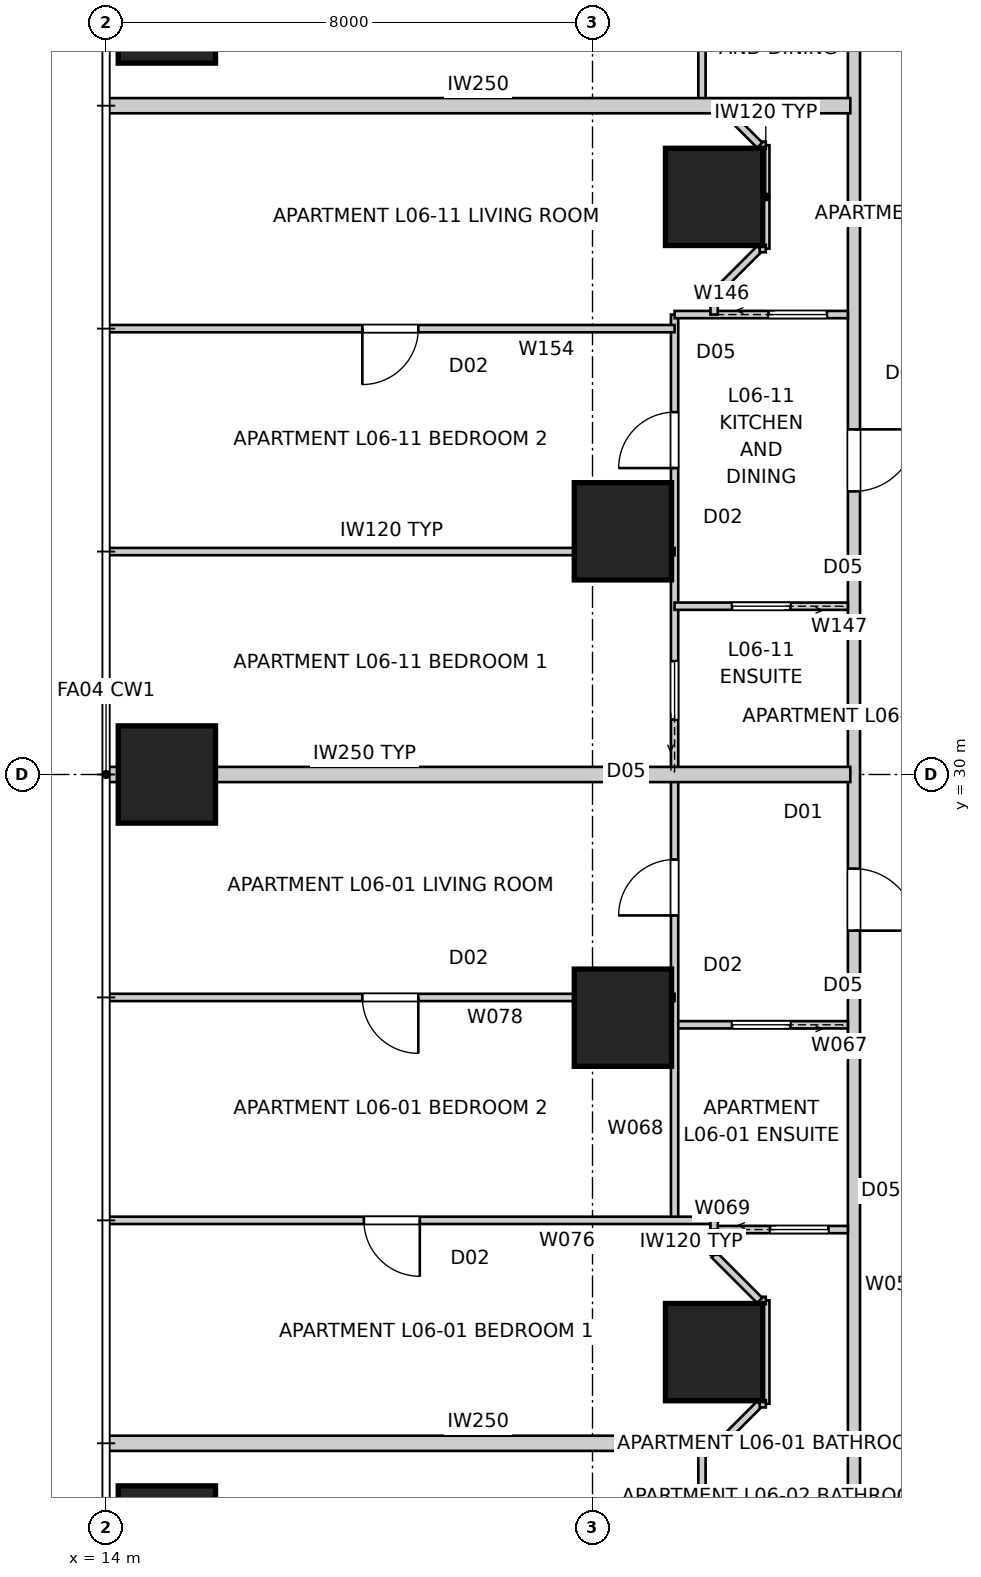
"""IFC4 building model, lengths in metres.
Left out: names, types, materials, properties, quantities, classifications, styles, units other than length and angle.
Written with IfcOpenShell. Run it as: python <this file> out.ifc"""

import sys

from ifc_helpers import new_model, si_unit, direction, frame, frame_2d, origin, origin_2d, place, context, subcontext, project, spatial, rectangle, extrude, element, fill, save


model = new_model("IFC4")
c1 = context("Model", 3, precision=1e-05, world=origin(), true_north=direction((0.0, 1.0)))
c2 = subcontext(c1, "Body", "Model", "MODEL_VIEW")
j1 = project(units=[si_unit("LENGTHUNIT", "METRE"), si_unit("PLANEANGLEUNIT", "RADIAN")], contexts=[c1])
p1 = place(None, origin())
s1 = spatial("IfcSite", under=j1, at=p1, CompositionType="ELEMENT")
p2 = place(p1, origin())
s2 = spatial("IfcBuilding", under=s1, at=p2, CompositionType="ELEMENT")
p3 = place(p2, frame((0.0, 0.0, 25.2)))
s3 = spatial("IfcBuildingStorey", under=s2, at=p3, CompositionType="ELEMENT", Elevation=25.2)
for number, where, z_axis, x_axis in (
    (1, (15.0, 42.5, 0.0), (0.0, 0.0, 1.0), (1.0, 0.0, 0.0)),
    (2, (15.0, 30.0, 0.0), (0.0, 0.0, 1.0), (1.0, 0.0, 0.0)),
    (3, (15.0, 17.5, 0.0), (0.0, 0.0, 1.0), (1.0, 0.0, 0.0)),
    (4, (24.0, 39.5, 0.0), (0.0, 0.0, 1.0), (1.0, 0.0, 0.0)),
    (5, (22.5, 34.0, 0.0), (0.0, 0.0, 1.0), (1.0, 0.0, 0.0)),
    (6, (22.5, 26.0, 0.0), (0.0, 0.0, 1.0), (1.0, 0.0, 0.0)),
    (7, (24.0, 20.5, 0.0), (0.0, 0.0, 1.0), (1.0, 0.0, 0.0)),
):
    element("IfcColumn", number, at=place(p3, frame(where, z_axis=z_axis, x_axis=x_axis)), inside=s3, PredefinedType="COLUMN", context=c2, shape_type="SweptSolid", body=[
        extrude(rectangle(XDim=1.6, YDim=1.6, at=origin_2d()), origin(), (0.0, 0.0, 1.0), 3.4),
    ])
p4 = place(p3, frame((26.3, 46.3, 0.0), z_axis=(0.0, 0.0, 1.0), x_axis=(0.0, -1.0, 0.0)))
e8 = element("IfcWall", 8, at=p4, inside=s3, PredefinedType="PARTITIONING", context=c2, shape_type="SweptSolid", body=[
    extrude(rectangle(XDim=32.6, YDim=0.2, at=frame_2d((16.3, 0.0))), origin(), (0.0, 0.0, 1.0), 3.25),
])
p5 = place(p4, frame((2.315, 0.0, 0.0)))
e9 = element("IfcOpeningElement", 9, at=p5, cuts=e8, PredefinedType="OPENING", context=c2, shape_type="SweptSolid", body=[
    extrude(rectangle(XDim=1.02, YDim=2.34, at=frame_2d((0.51, 1.17))), frame((0.0, 0.11, 0.0), z_axis=(0.0, -1.0, 0.0), x_axis=(1.0, 0.0, 0.0)), (0.0, 0.0, 1.0), 0.22),
])
p6 = place(p4, frame((10.624, 0.0, 0.0)))
e10 = element("IfcOpeningElement", 10, at=p6, cuts=e8, PredefinedType="OPENING", context=c2, shape_type="SweptSolid", body=[
    extrude(rectangle(XDim=1.02, YDim=2.34, at=frame_2d((0.51, 1.17))), frame((0.0, 0.11, 0.0), z_axis=(0.0, -1.0, 0.0), x_axis=(1.0, 0.0, 0.0)), (0.0, 0.0, 1.0), 0.22),
])
p7 = place(p4, frame((17.848, 0.0, 0.0)))
e11 = element("IfcOpeningElement", 11, at=p7, cuts=e8, PredefinedType="OPENING", context=c2, shape_type="SweptSolid", body=[
    extrude(rectangle(XDim=1.02, YDim=2.34, at=frame_2d((0.51, 1.17))), frame((0.0, 0.11, 0.0), z_axis=(0.0, -1.0, 0.0), x_axis=(1.0, 0.0, 0.0)), (0.0, 0.0, 1.0), 0.22),
])
p8 = place(p4, frame((30.516, 0.0, 0.0)))
e12 = element("IfcOpeningElement", 12, at=p8, cuts=e8, PredefinedType="OPENING", context=c2, shape_type="SweptSolid", body=[
    extrude(rectangle(XDim=1.02, YDim=2.34, at=frame_2d((0.51, 1.17))), frame((0.0, 0.11, 0.0), z_axis=(0.0, -1.0, 0.0), x_axis=(1.0, 0.0, 0.0)), (0.0, 0.0, 1.0), 0.22),
])
for number, where, z_axis, x_axis in (
    (13, (14.0, 41.0, 0.0), (0.0, 0.0, 1.0), (1.0, 0.0, 0.0)),
    (14, (14.0, 19.0, 0.0), (0.0, 0.0, 1.0), (1.0, 0.0, 0.0)),
):
    element("IfcWall", number, at=place(p3, frame(where, z_axis=z_axis, x_axis=x_axis)), inside=s3, PredefinedType="PARTITIONING", context=c2, shape_type="SweptSolid", body=[
        extrude(rectangle(XDim=12.24, YDim=0.25, at=frame_2d((6.12, 0.0))), origin(), (0.0, 0.0, 1.0), 3.25),
    ])
p9 = place(p3, frame((14.0, 30.0, 0.0), z_axis=(0.0, 0.0, 1.0), x_axis=(1.0, 0.0, 0.0)))
e15 = element("IfcWall", 15, at=p9, inside=s3, PredefinedType="PARTITIONING", context=c2, shape_type="SweptSolid", body=[
    extrude(rectangle(XDim=8.5, YDim=0.25, at=frame_2d((4.25, 0.0))), origin(), (0.0, 0.0, 1.0), 3.25),
])
p10 = place(p3, frame((22.5, 30.0, 0.0), z_axis=(0.0, 0.0, 1.0), x_axis=(1.0, 0.0, 0.0)))
e16 = element("IfcWall", 16, at=p10, inside=s3, PredefinedType="PARTITIONING", context=c2, shape_type="SweptSolid", body=[
    extrude(rectangle(XDim=3.74, YDim=0.25, at=frame_2d((1.87, 0.0))), origin(), (0.0, 0.0, 1.0), 2.796),
])
p11 = place(p3, frame((26.2, 25.884, 0.0), z_axis=(0.0, 0.0, 1.0), x_axis=(-1.0, 0.0, 0.0)))
e17 = element("IfcWall", 17, at=p11, inside=s3, PredefinedType="PARTITIONING", context=c2, shape_type="SweptSolid", body=[
    extrude(rectangle(XDim=2.85, YDim=0.12, at=frame_2d((1.425, 0.0))), origin(), (0.0, 0.0, 1.0), 3.25),
])
p12 = place(p11, frame((0.945, 0.0, 0.0)))
e18 = element("IfcOpeningElement", 18, at=p12, cuts=e17, PredefinedType="OPENING", context=c2, shape_type="SweptSolid", body=[
    extrude(rectangle(XDim=0.96, YDim=2.1, at=frame_2d((0.48, 1.05))), frame((0.0, 0.07, 0.0), z_axis=(0.0, -1.0, 0.0), x_axis=(1.0, 0.0, 0.0)), (0.0, 0.0, 1.0), 0.14),
])
p13 = place(p3, frame((23.35, 22.667, 0.0), z_axis=(0.0, 0.0, 1.0), x_axis=(0.0, 1.0, 0.0)))
e19 = element("IfcWall", 19, at=p13, inside=s3, PredefinedType="PARTITIONING", context=c2, shape_type="SweptSolid", body=[
    extrude(rectangle(XDim=14.898, YDim=0.12, at=frame_2d((7.449, 0.0))), origin(), (0.0, 0.0, 1.0), 2.55),
])
p14 = place(p13, frame((12.373, 0.0, 0.0)))
e20 = element("IfcOpeningElement", 20, at=p14, cuts=e19, PredefinedType="OPENING", context=c2, shape_type="SweptSolid", body=[
    extrude(rectangle(XDim=0.92, YDim=2.34, at=frame_2d((0.46, 1.17))), frame((0.0, 0.07, 0.0), z_axis=(0.0, -1.0, 0.0), x_axis=(1.0, 0.0, 0.0)), (0.0, 0.0, 1.0), 0.14),
])
p15 = place(p13, frame((5.015, 0.0, 0.0)))
e21 = element("IfcOpeningElement", 21, at=p15, cuts=e19, PredefinedType="OPENING", context=c2, shape_type="SweptSolid", body=[
    extrude(rectangle(XDim=0.92, YDim=2.34, at=frame_2d((0.46, 1.17))), frame((0.0, 0.07, 0.0), z_axis=(0.0, -1.0, 0.0), x_axis=(1.0, 0.0, 0.0)), (0.0, 0.0, 1.0), 0.14),
])
p16 = place(p13, frame((8.237, 0.0, 0.0)))
e22 = element("IfcOpeningElement", 22, at=p16, cuts=e19, PredefinedType="OPENING", context=c2, shape_type="SweptSolid", body=[
    extrude(rectangle(XDim=0.96, YDim=2.1, at=frame_2d((0.48, 1.05))), frame((0.0, 0.07, 0.0), z_axis=(0.0, -1.0, 0.0), x_axis=(1.0, 0.0, 0.0)), (0.0, 0.0, 1.0), 0.14),
])
p17 = place(p3, frame((24.0, 22.515, 0.0), z_axis=(0.0, 0.0, 1.0), x_axis=(1.0, 0.0, 0.0)))
e23 = element("IfcWall", 23, at=p17, inside=s3, PredefinedType="PARTITIONING", context=c2, shape_type="SweptSolid", body=[
    extrude(rectangle(XDim=2.2, YDim=0.12, at=frame_2d((1.1, 0.0))), origin(), (0.0, 0.0, 1.0), 3.25),
])
p18 = place(p17, frame((0.92, 0.0, 0.0)))
e24 = element("IfcOpeningElement", 24, at=p18, cuts=e23, PredefinedType="OPENING", context=c2, shape_type="SweptSolid", body=[
    extrude(rectangle(XDim=0.96, YDim=2.1, at=frame_2d((0.48, 1.05))), frame((0.0, 0.07, 0.0), z_axis=(0.0, -1.0, 0.0), x_axis=(1.0, 0.0, 0.0)), (0.0, 0.0, 1.0), 0.14),
])
p19 = place(p3, frame((24.1, 19.0, 0.0), z_axis=(0.0, 0.0, 1.0), x_axis=(0.707106781187, 0.707106781187, 0.0)))
e25 = element("IfcWall", 25, at=p19, inside=s3, PredefinedType="PARTITIONING", context=c2, shape_type="SweptSolid", body=[
    extrude(rectangle(XDim=0.919, YDim=0.12, at=frame_2d((0.459, 0.0))), origin(), (0.0, 0.0, 1.0), 3.25),
])
p20 = place(p3, frame((24.85, 19.65, 0.0), z_axis=(0.0, 0.0, 1.0), x_axis=(0.0, 1.0, 0.0)))
e26 = element("IfcWall", 26, at=p20, inside=s3, PredefinedType="PARTITIONING", context=c2, shape_type="SweptSolid", body=[
    extrude(rectangle(XDim=1.7, YDim=0.12, at=frame_2d((0.85, 0.0))), origin(), (0.0, 0.0, 1.0), 3.25),
])
p21 = place(p3, frame((24.75, 21.35, 0.0), z_axis=(0.0, 0.0, 1.0), x_axis=(-0.707106781187, 0.707106781187, 0.0)))
e27 = element("IfcWall", 27, at=p21, inside=s3, PredefinedType="PARTITIONING", context=c2, shape_type="SweptSolid", body=[
    extrude(rectangle(XDim=1.061, YDim=0.12, at=frame_2d((0.53, 0.0))), origin(), (0.0, 0.0, 1.0), 3.25),
])
p22 = place(p3, frame((24.0, 22.1, 0.0), z_axis=(0.0, 0.0, 1.0), x_axis=(0.0, 1.0, 0.0)))
e28 = element("IfcWall", 28, at=p22, inside=s3, PredefinedType="PARTITIONING", context=c2, shape_type="SweptSolid", body=[
    extrude(rectangle(XDim=0.415, YDim=0.12, at=frame_2d((0.208, 0.0))), origin(), (0.0, 0.0, 1.0), 3.25),
])
p23 = place(p3, frame((24.0, 22.667, 0.0), z_axis=(0.0, 0.0, 1.0), x_axis=(-1.0, 0.0, 0.0)))
e29 = element("IfcWall", 29, at=p23, inside=s3, PredefinedType="PARTITIONING", context=c2, shape_type="SweptSolid", body=[
    extrude(rectangle(XDim=9.96, YDim=0.12, at=frame_2d((4.98, 0.0))), origin(), (0.0, 0.0, 1.0), 3.25),
])
p24 = place(p23, frame((4.84, 0.0, 0.0)))
e30 = element("IfcOpeningElement", 30, at=p24, cuts=e29, PredefinedType="OPENING", context=c2, shape_type="SweptSolid", body=[
    extrude(rectangle(XDim=0.92, YDim=2.34, at=frame_2d((0.46, 1.17))), frame((0.0, 0.07, 0.0), z_axis=(0.0, -1.0, 0.0), x_axis=(1.0, 0.0, 0.0)), (0.0, 0.0, 1.0), 0.14),
])
p25 = place(p3, frame((23.35, 26.333, 0.0), z_axis=(0.0, 0.0, 1.0), x_axis=(-1.0, 0.0, 0.0)))
e31 = element("IfcWall", 31, at=p25, inside=s3, PredefinedType="PARTITIONING", context=c2, shape_type="SweptSolid", body=[
    extrude(rectangle(XDim=9.31, YDim=0.12, at=frame_2d((4.655, 0.0))), origin(), (0.0, 0.0, 1.0), 3.25),
])
p26 = place(p25, frame((4.215, 0.0, 0.0)))
e32 = element("IfcOpeningElement", 32, at=p26, cuts=e31, PredefinedType="OPENING", context=c2, shape_type="SweptSolid", body=[
    extrude(rectangle(XDim=0.92, YDim=2.34, at=frame_2d((0.46, 1.17))), frame((0.0, 0.07, 0.0), z_axis=(0.0, -1.0, 0.0), x_axis=(1.0, 0.0, 0.0)), (0.0, 0.0, 1.0), 0.14),
])
p27 = place(p3, frame((23.8, 15.233, 0.0), z_axis=(0.0, 0.0, 1.0), x_axis=(0.0, 1.0, 0.0)))
e33 = element("IfcWall", 33, at=p27, inside=s3, PredefinedType="PARTITIONING", context=c2, shape_type="SweptSolid", body=[
    extrude(rectangle(XDim=3.767, YDim=0.12, at=frame_2d((1.883, 0.0))), origin(), (0.0, 0.0, 1.0), 3.25),
])
p28 = place(p3, frame((23.8, 41.0, 0.0), z_axis=(0.0, 0.0, 1.0), x_axis=(0.0, 1.0, 0.0)))
e34 = element("IfcWall", 34, at=p28, inside=s3, PredefinedType="PARTITIONING", context=c2, shape_type="SweptSolid", body=[
    extrude(rectangle(XDim=7.333, YDim=0.12, at=frame_2d((3.667, 0.0))), origin(), (0.0, 0.0, 1.0), 3.25),
])
p29 = place(p28, frame((3.207, 0.0, 0.0)))
e35 = element("IfcOpeningElement", 35, at=p29, cuts=e34, PredefinedType="OPENING", context=c2, shape_type="SweptSolid", body=[
    extrude(rectangle(XDim=0.92, YDim=2.34, at=frame_2d((0.46, 1.17))), frame((0.0, 0.07, 0.0), z_axis=(0.0, -1.0, 0.0), x_axis=(1.0, 0.0, 0.0)), (0.0, 0.0, 1.0), 0.14),
])
p30 = place(p3, frame((23.35, 37.565, 0.0), z_axis=(0.0, 0.0, 1.0), x_axis=(1.0, 0.0, 0.0)))
e36 = element("IfcWall", 36, at=p30, inside=s3, PredefinedType="PARTITIONING", context=c2, shape_type="SweptSolid", body=[
    extrude(rectangle(XDim=2.85, YDim=0.12, at=frame_2d((1.425, 0.0))), origin(), (0.0, 0.0, 1.0), 3.25),
])
p31 = place(p30, frame((1.545, 0.0, 0.0)))
e37 = element("IfcOpeningElement", 37, at=p31, cuts=e36, PredefinedType="OPENING", context=c2, shape_type="SweptSolid", body=[
    extrude(rectangle(XDim=0.96, YDim=2.1, at=frame_2d((0.48, 1.05))), frame((0.0, 0.07, 0.0), z_axis=(0.0, -1.0, 0.0), x_axis=(1.0, 0.0, 0.0)), (0.0, 0.0, 1.0), 0.14),
])
p32 = place(p3, frame((26.2, 32.768, 0.0), z_axis=(0.0, 0.0, 1.0), x_axis=(-1.0, 0.0, 0.0)))
e38 = element("IfcWall", 38, at=p32, inside=s3, PredefinedType="PARTITIONING", context=c2, shape_type="SweptSolid", body=[
    extrude(rectangle(XDim=2.85, YDim=0.12, at=frame_2d((1.425, 0.0))), origin(), (0.0, 0.0, 1.0), 3.25),
])
p33 = place(p32, frame((0.945, 0.0, 0.0)))
e39 = element("IfcOpeningElement", 39, at=p33, cuts=e38, PredefinedType="OPENING", context=c2, shape_type="SweptSolid", body=[
    extrude(rectangle(XDim=0.96, YDim=2.1, at=frame_2d((0.48, 1.05))), frame((0.0, 0.07, 0.0), z_axis=(0.0, -1.0, 0.0), x_axis=(1.0, 0.0, 0.0)), (0.0, 0.0, 1.0), 0.14),
])
p34 = place(p3, frame((24.0, 37.565, 0.0), z_axis=(0.0, 0.0, 1.0), x_axis=(0.0, 1.0, 0.0)))
e40 = element("IfcWall", 40, at=p34, inside=s3, PredefinedType="PARTITIONING", context=c2, shape_type="SweptSolid", body=[
    extrude(rectangle(XDim=0.335, YDim=0.12, at=frame_2d((0.167, 0.0))), origin(), (0.0, 0.0, 1.0), 3.25),
])
p35 = place(p3, frame((24.0, 37.9, 0.0), z_axis=(0.0, 0.0, 1.0), x_axis=(0.707106781187, 0.707106781187, 0.0)))
e41 = element("IfcWall", 41, at=p35, inside=s3, PredefinedType="PARTITIONING", context=c2, shape_type="SweptSolid", body=[
    extrude(rectangle(XDim=1.061, YDim=0.12, at=frame_2d((0.53, 0.0))), origin(), (0.0, 0.0, 1.0), 3.25),
])
p36 = place(p3, frame((24.85, 38.65, 0.0), z_axis=(0.0, 0.0, 1.0), x_axis=(0.0, 1.0, 0.0)))
e42 = element("IfcWall", 42, at=p36, inside=s3, PredefinedType="PARTITIONING", context=c2, shape_type="SweptSolid", body=[
    extrude(rectangle(XDim=1.7, YDim=0.12, at=frame_2d((0.85, 0.0))), origin(), (0.0, 0.0, 1.0), 3.25),
])
p37 = place(p3, frame((24.75, 40.35, 0.0), z_axis=(0.0, 0.0, 1.0), x_axis=(-0.707106781187, 0.707106781187, 0.0)))
e43 = element("IfcWall", 43, at=p37, inside=s3, PredefinedType="PARTITIONING", context=c2, shape_type="SweptSolid", body=[
    extrude(rectangle(XDim=0.919, YDim=0.12, at=frame_2d((0.459, 0.0))), origin(), (0.0, 0.0, 1.0), 3.25),
])
p38 = place(p3, frame((23.35, 37.333, 0.0), z_axis=(0.0, 0.0, 1.0), x_axis=(-1.0, 0.0, 0.0)))
e44 = element("IfcWall", 44, at=p38, inside=s3, PredefinedType="PARTITIONING", context=c2, shape_type="SweptSolid", body=[
    extrude(rectangle(XDim=9.31, YDim=0.12, at=frame_2d((4.655, 0.0))), origin(), (0.0, 0.0, 1.0), 3.25),
])
p39 = place(p38, frame((4.215, 0.0, 0.0)))
e45 = element("IfcOpeningElement", 45, at=p39, cuts=e44, PredefinedType="OPENING", context=c2, shape_type="SweptSolid", body=[
    extrude(rectangle(XDim=0.92, YDim=2.34, at=frame_2d((0.46, 1.17))), frame((0.0, 0.07, 0.0), z_axis=(0.0, -1.0, 0.0), x_axis=(1.0, 0.0, 0.0)), (0.0, 0.0, 1.0), 0.14),
])
p40 = place(p3, frame((14.04, 33.667, 0.0), z_axis=(0.0, 0.0, 1.0), x_axis=(1.0, 0.0, 0.0)))
e46 = element("IfcWall", 46, at=p40, inside=s3, PredefinedType="PARTITIONING", context=c2, shape_type="SweptSolid", body=[
    extrude(rectangle(XDim=9.31, YDim=0.12, at=frame_2d((4.655, 0.0))), origin(), (0.0, 0.0, 1.0), 3.25),
])
for number, where, z_axis, x_axis in (
    (47, (24.85, 19.65, 0.0), (0.0, 0.0, 1.0), (-1.0, 0.0, 0.0)),
    (48, (24.85, 21.35, 0.0), (0.0, 0.0, 1.0), (-1.0, 0.0, 0.0)),
):
    element("IfcWall", number, at=place(p3, frame(where, z_axis=z_axis, x_axis=x_axis)), inside=s3, PredefinedType="PARTITIONING", context=c2, shape_type="SweptSolid", body=[
        extrude(rectangle(XDim=0.1, YDim=0.12, at=frame_2d((0.05, 0.0))), origin(), (0.0, 0.0, 1.0), 3.25),
    ])
p41 = place(p3, frame((24.0, 22.667, 0.0), z_axis=(0.0, 0.0, 1.0), x_axis=(0.0, -1.0, 0.0)))
e49 = element("IfcWall", 49, at=p41, inside=s3, PredefinedType="PARTITIONING", context=c2, shape_type="SweptSolid", body=[
    extrude(rectangle(XDim=0.151, YDim=0.12, at=frame_2d((0.076, 0.0))), origin(), (0.0, 0.0, 1.0), 3.25),
])
for number, where, z_axis, x_axis in (
    (50, (24.85, 38.65, 0.0), (0.0, 0.0, 1.0), (-1.0, 0.0, 0.0)),
    (51, (24.85, 40.35, 0.0), (0.0, 0.0, 1.0), (-1.0, 0.0, 0.0)),
):
    element("IfcWall", number, at=place(p3, frame(where, z_axis=z_axis, x_axis=x_axis)), inside=s3, PredefinedType="PARTITIONING", context=c2, shape_type="SweptSolid", body=[
        extrude(rectangle(XDim=0.1, YDim=0.12, at=frame_2d((0.05, 0.0))), origin(), (0.0, 0.0, 1.0), 3.25),
    ])
p42 = place(p6, origin())
e52 = element("IfcDoor", 52, at=p42, inside=s3, OperationType="SINGLE_SWING_LEFT", PredefinedType="DOOR", context=c2, shape_type="SweptSolid", body=[
    extrude(rectangle(XDim=1.02, YDim=2.34, at=frame_2d((0.51, 1.17))), frame((0.0, 0.025, 0.0), z_axis=(0.0, -1.0, 0.0), x_axis=(1.0, 0.0, 0.0)), (0.0, 0.0, 1.0), 0.05),
])
fill(e10, e52)
p43 = place(p7, origin())
e53 = element("IfcDoor", 53, at=p43, inside=s3, OperationType="SINGLE_SWING_RIGHT", PredefinedType="DOOR", context=c2, shape_type="SweptSolid", body=[
    extrude(rectangle(XDim=1.02, YDim=2.34, at=frame_2d((0.51, 1.17))), frame((0.0, 0.025, 0.0), z_axis=(0.0, -1.0, 0.0), x_axis=(1.0, 0.0, 0.0)), (0.0, 0.0, 1.0), 0.05),
])
fill(e11, e53)
p44 = place(p14, origin())
e54 = element("IfcDoor", 54, at=p44, inside=s3, OperationType="SINGLE_SWING_LEFT", PredefinedType="DOOR", context=c2, shape_type="SweptSolid", body=[
    extrude(rectangle(XDim=0.92, YDim=2.34, at=frame_2d((0.46, 1.17))), frame((0.0, 0.025, 0.0), z_axis=(0.0, -1.0, 0.0), x_axis=(1.0, 0.0, 0.0)), (0.0, 0.0, 1.0), 0.05),
])
fill(e20, e54)
p45 = place(p33, origin())
e55 = element("IfcDoor", 55, at=p45, inside=s3, OperationType="SLIDING_TO_LEFT", PredefinedType="DOOR", context=c2, shape_type="SweptSolid", body=[
    extrude(rectangle(XDim=0.96, YDim=2.1, at=frame_2d((0.48, 1.05))), frame((0.0, 0.025, 0.0), z_axis=(0.0, -1.0, 0.0), x_axis=(1.0, 0.0, 0.0)), (0.0, 0.0, 1.0), 0.05),
])
fill(e39, e55)
p46 = place(p31, origin())
e56 = element("IfcDoor", 56, at=p46, inside=s3, OperationType="SLIDING_TO_LEFT", PredefinedType="DOOR", context=c2, shape_type="SweptSolid", body=[
    extrude(rectangle(XDim=0.96, YDim=2.1, at=frame_2d((0.48, 1.05))), frame((0.0, 0.025, 0.0), z_axis=(0.0, -1.0, 0.0), x_axis=(1.0, 0.0, 0.0)), (0.0, 0.0, 1.0), 0.05),
])
fill(e37, e56)
p47 = place(p15, origin())
e57 = element("IfcDoor", 57, at=p47, inside=s3, OperationType="SINGLE_SWING_LEFT", PredefinedType="DOOR", context=c2, shape_type="SweptSolid", body=[
    extrude(rectangle(XDim=0.92, YDim=2.34, at=frame_2d((0.46, 1.17))), frame((0.0, 0.025, 0.0), z_axis=(0.0, -1.0, 0.0), x_axis=(1.0, 0.0, 0.0)), (0.0, 0.0, 1.0), 0.05),
])
fill(e21, e57)
p48 = place(p12, origin())
e58 = element("IfcDoor", 58, at=p48, inside=s3, OperationType="SLIDING_TO_LEFT", PredefinedType="DOOR", context=c2, shape_type="SweptSolid", body=[
    extrude(rectangle(XDim=0.96, YDim=2.1, at=frame_2d((0.48, 1.05))), frame((0.0, 0.025, 0.0), z_axis=(0.0, -1.0, 0.0), x_axis=(1.0, 0.0, 0.0)), (0.0, 0.0, 1.0), 0.05),
])
fill(e18, e58)
p49 = place(p16, origin())
e59 = element("IfcDoor", 59, at=p49, inside=s3, OperationType="SLIDING_TO_LEFT", PredefinedType="DOOR", context=c2, shape_type="SweptSolid", body=[
    extrude(rectangle(XDim=0.96, YDim=2.1, at=frame_2d((0.48, 1.05))), frame((0.0, 0.025, 0.0), z_axis=(0.0, -1.0, 0.0), x_axis=(1.0, 0.0, 0.0)), (0.0, 0.0, 1.0), 0.05),
])
fill(e22, e59)
p50 = place(p26, origin())
e60 = element("IfcDoor", 60, at=p50, inside=s3, OperationType="SINGLE_SWING_LEFT", PredefinedType="DOOR", context=c2, shape_type="SweptSolid", body=[
    extrude(rectangle(XDim=0.92, YDim=2.34, at=frame_2d((0.46, 1.17))), frame((0.0, 0.025, 0.0), z_axis=(0.0, -1.0, 0.0), x_axis=(1.0, 0.0, 0.0)), (0.0, 0.0, 1.0), 0.05),
])
fill(e32, e60)
p51 = place(p18, origin())
e61 = element("IfcDoor", 61, at=p51, inside=s3, OperationType="SLIDING_TO_LEFT", PredefinedType="DOOR", context=c2, shape_type="SweptSolid", body=[
    extrude(rectangle(XDim=0.96, YDim=2.1, at=frame_2d((0.48, 1.05))), frame((0.0, 0.025, 0.0), z_axis=(0.0, -1.0, 0.0), x_axis=(1.0, 0.0, 0.0)), (0.0, 0.0, 1.0), 0.05),
])
fill(e24, e61)
p52 = place(p39, origin())
e62 = element("IfcDoor", 62, at=p52, inside=s3, OperationType="SINGLE_SWING_RIGHT", PredefinedType="DOOR", context=c2, shape_type="SweptSolid", body=[
    extrude(rectangle(XDim=0.92, YDim=2.34, at=frame_2d((0.46, 1.17))), frame((0.0, 0.025, 0.0), z_axis=(0.0, -1.0, 0.0), x_axis=(1.0, 0.0, 0.0)), (0.0, 0.0, 1.0), 0.05),
])
fill(e45, e62)
p53 = place(p24, origin())
e63 = element("IfcDoor", 63, at=p53, inside=s3, OperationType="SINGLE_SWING_LEFT", PredefinedType="DOOR", context=c2, shape_type="SweptSolid", body=[
    extrude(rectangle(XDim=0.92, YDim=2.34, at=frame_2d((0.46, 1.17))), frame((0.0, 0.025, 0.0), z_axis=(0.0, -1.0, 0.0), x_axis=(1.0, 0.0, 0.0)), (0.0, 0.0, 1.0), 0.05),
])
fill(e30, e63)
save(model, sys.argv[1])
